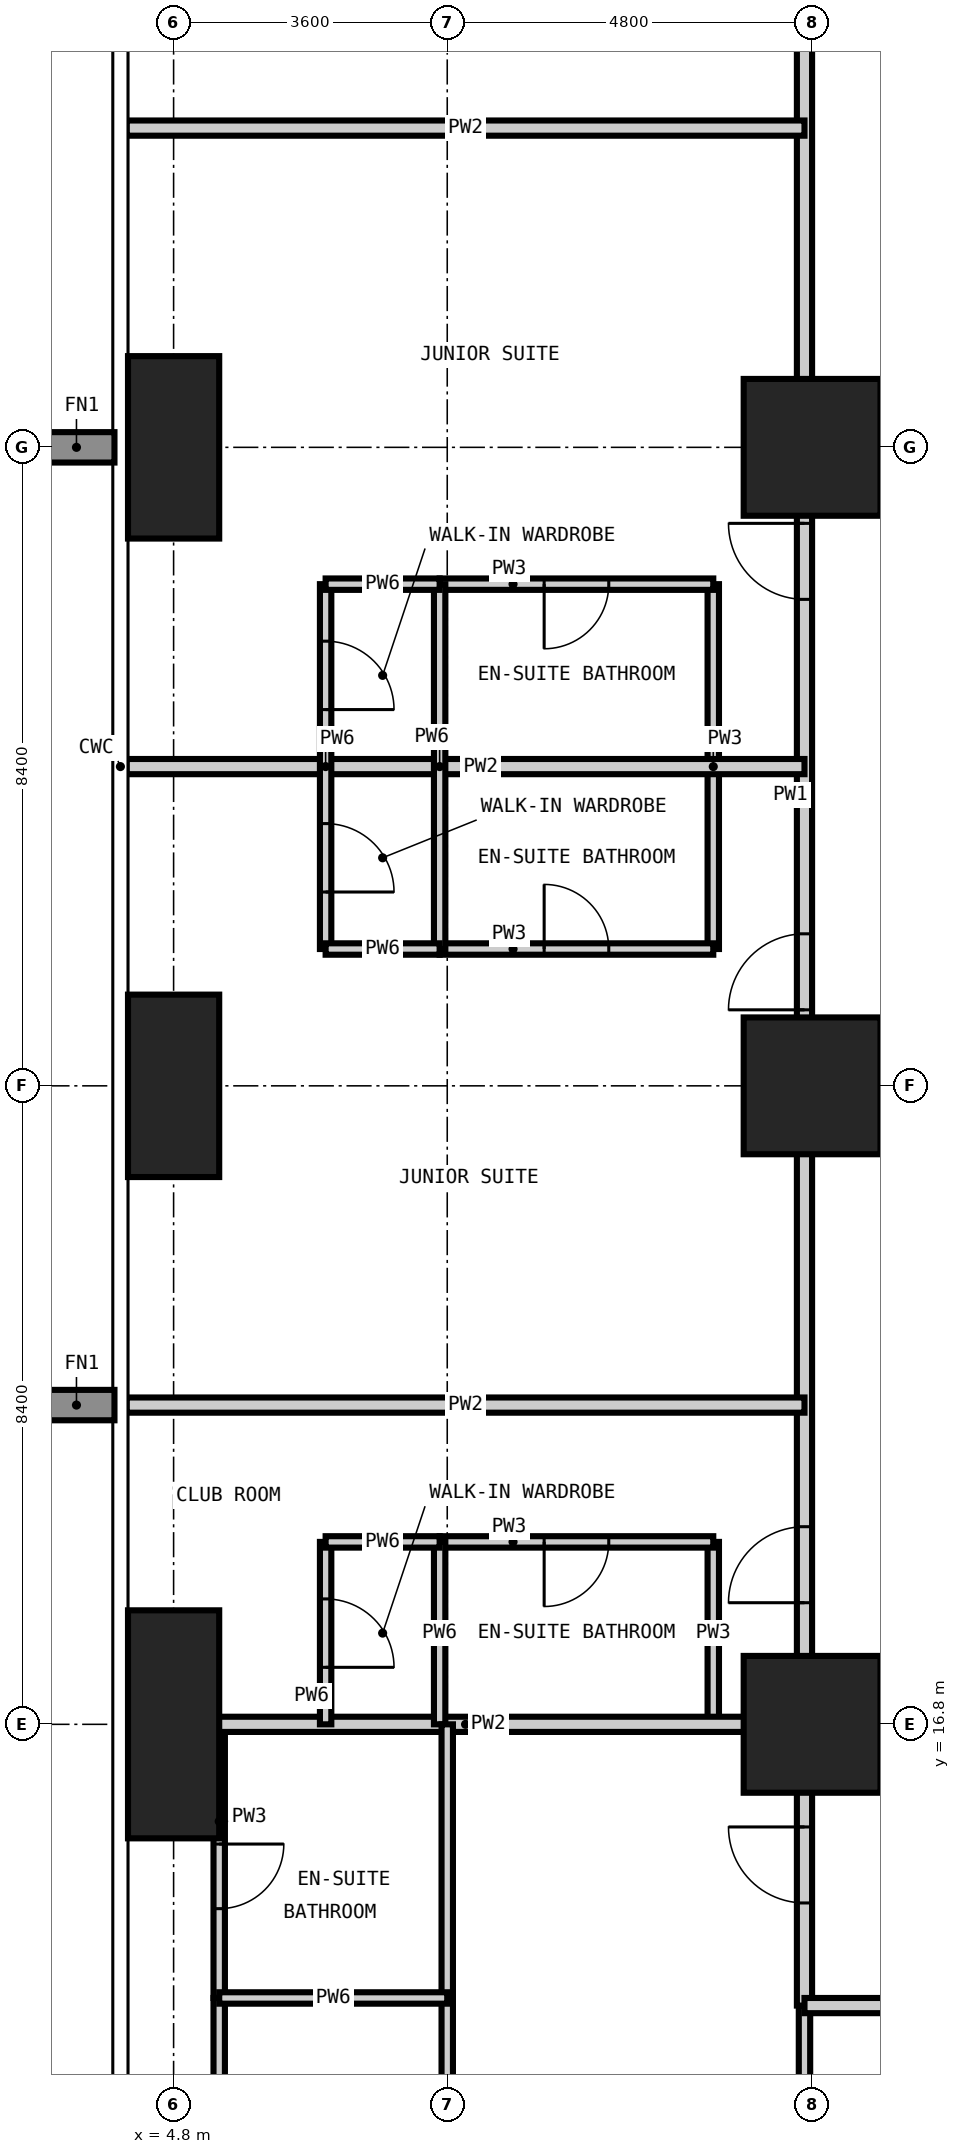
"""IFC4 building model, lengths in metres.
Left out: names, types, materials, properties, quantities, classifications, styles, units other than length and angle.
Written with IfcOpenShell. Run it as: python <this file> out.ifc"""

import sys

from ifc_helpers import new_model, si_unit, direction, frame, frame_2d, origin, origin_2d, place, context, subcontext, project, spatial, rectangle, extrude, element, fill, save


model = new_model("IFC4")
c1 = context("Model", 3, precision=1e-05, world=origin(), true_north=direction((0.0, 1.0)))
c2 = subcontext(c1, "Body", "Model", "MODEL_VIEW")
j1 = project(units=[si_unit("LENGTHUNIT", "METRE"), si_unit("PLANEANGLEUNIT", "RADIAN")], contexts=[c1])
p1 = place(None, origin())
s1 = spatial("IfcSite", under=j1, at=p1, CompositionType="ELEMENT")
p2 = place(p1, origin())
s2 = spatial("IfcBuilding", under=s1, at=p2, CompositionType="ELEMENT")
p3 = place(p2, frame((0.0, 0.0, 216.6)))
s3 = spatial("IfcBuildingStorey", under=s2, at=p3, CompositionType="ELEMENT", Elevation=216.6)
p4 = place(p3, frame((4.8, 16.8, -0.35), z_axis=(0.0, 0.0, 1.0), x_axis=(1.0, 0.0, 0.0)))
e1 = element("IfcColumn", 1, at=p4, inside=s3, PredefinedType="COLUMN", context=c2, shape_type="SweptSolid", body=[
    extrude(rectangle(XDim=1.2, YDim=3.0, at=origin_2d()), origin(), (0.0, 0.0, 1.0), 3.55),
])
for number, where, z_axis, x_axis in (
    (2, (4.8, 25.2, -0.35), (0.0, 0.0, 1.0), (1.0, 0.0, 0.0)),
    (3, (4.8, 33.6, -0.35), (0.0, 0.0, 1.0), (1.0, 0.0, 0.0)),
):
    element("IfcColumn", number, at=place(p3, frame(where, z_axis=z_axis, x_axis=x_axis)), inside=s3, PredefinedType="COLUMN", context=c2, shape_type="SweptSolid", body=[
        extrude(rectangle(XDim=1.2, YDim=2.4, at=origin_2d()), origin(), (0.0, 0.0, 1.0), 3.55),
    ])
for number, where, z_axis, x_axis in (
    (4, (13.2, 16.8, -0.35), (0.0, 0.0, 1.0), (1.0, 0.0, 0.0)),
    (5, (13.2, 25.2, -0.35), (0.0, 0.0, 1.0), (1.0, 0.0, 0.0)),
    (6, (13.2, 33.6, -0.35), (0.0, 0.0, 1.0), (1.0, 0.0, 0.0)),
):
    element("IfcColumn", number, at=place(p3, frame(where, z_axis=z_axis, x_axis=x_axis)), inside=s3, PredefinedType="COLUMN", context=c2, shape_type="SweptSolid", body=[
        extrude(rectangle(XDim=1.8, YDim=1.8, at=origin_2d()), origin(), (0.0, 0.0, 1.0), 3.55),
    ])
p5 = place(p3, frame((5.4, 13.2, 0.0), z_axis=(0.0, 0.0, 1.0), x_axis=(0.0, 1.0, 0.0)))
e7 = element("IfcWall", 7, at=p5, inside=s3, PredefinedType="PARTITIONING", context=c2, shape_type="SweptSolid", body=[
    extrude(rectangle(XDim=3.6, YDim=0.15, at=frame_2d((1.8, 0.0))), origin(), (0.0, 0.0, 1.0), 3.2),
])
p6 = place(p5, frame((1.175, 0.0, 0.0)))
e8 = element("IfcOpeningElement", 8, at=p6, cuts=e7, PredefinedType="OPENING", context=c2, shape_type="SweptSolid", body=[
    extrude(rectangle(XDim=0.85, YDim=2.1, at=frame_2d((0.425, 1.05))), frame((0.0, 0.085, 0.0), z_axis=(0.0, -1.0, 0.0), x_axis=(1.0, 0.0, 0.0)), (0.0, 0.0, 1.0), 0.17),
])
p7 = place(p3, frame((11.9, 16.8, 0.0), z_axis=(0.0, 0.0, 1.0), x_axis=(0.0, 1.0, 0.0)))
e9 = element("IfcWall", 9, at=p7, inside=s3, PredefinedType="PARTITIONING", context=c2, shape_type="SweptSolid", body=[
    extrude(rectangle(XDim=2.4, YDim=0.15, at=frame_2d((1.2, 0.0))), origin(), (0.0, 0.0, 1.0), 3.2),
])
p8 = place(p3, frame((11.9, 27.0, 0.0), z_axis=(0.0, 0.0, 1.0), x_axis=(0.0, 1.0, 0.0)))
e10 = element("IfcWall", 10, at=p8, inside=s3, PredefinedType="PARTITIONING", context=c2, shape_type="SweptSolid", body=[
    extrude(rectangle(XDim=4.8, YDim=0.15, at=frame_2d((2.4, 0.0))), origin(), (0.0, 0.0, 1.0), 3.2),
])
p9 = place(p3, frame((13.1, 10.1, 0.0), z_axis=(0.0, 0.0, 1.0), x_axis=(0.0, 1.0, 0.0)))
e11 = element("IfcWall", 11, at=p9, inside=s3, PredefinedType="PARTITIONING", context=c2, shape_type="SweptSolid", body=[
    extrude(rectangle(XDim=3.0, YDim=0.15, at=frame_2d((1.5, 0.0))), origin(), (0.0, 0.0, 1.0), 3.2),
])
p10 = place(p3, frame((8.3, 19.2, 0.0), z_axis=(0.0, 0.0, 1.0), x_axis=(1.0, 0.0, 0.0)))
e12 = element("IfcWall", 12, at=p10, inside=s3, PredefinedType="PARTITIONING", context=c2, shape_type="SweptSolid", body=[
    extrude(rectangle(XDim=3.6, YDim=0.15, at=frame_2d((1.8, 0.0))), origin(), (0.0, 0.0, 1.0), 3.2),
])
p11 = place(p10, frame((1.375, 0.0, 0.0)))
e13 = element("IfcOpeningElement", 13, at=p11, cuts=e12, PredefinedType="OPENING", context=c2, shape_type="SweptSolid", body=[
    extrude(rectangle(XDim=0.85, YDim=2.1, at=frame_2d((0.425, 1.05))), frame((0.0, 0.085, 0.0), z_axis=(0.0, -1.0, 0.0), x_axis=(1.0, 0.0, 0.0)), (0.0, 0.0, 1.0), 0.17),
])
p12 = place(p3, frame((8.3, 27.0, 0.0), z_axis=(0.0, 0.0, 1.0), x_axis=(1.0, 0.0, 0.0)))
e14 = element("IfcWall", 14, at=p12, inside=s3, PredefinedType="PARTITIONING", context=c2, shape_type="SweptSolid", body=[
    extrude(rectangle(XDim=3.6, YDim=0.15, at=frame_2d((1.8, 0.0))), origin(), (0.0, 0.0, 1.0), 3.2),
])
p13 = place(p12, frame((1.375, 0.0, 0.0)))
e15 = element("IfcOpeningElement", 15, at=p13, cuts=e14, PredefinedType="OPENING", context=c2, shape_type="SweptSolid", body=[
    extrude(rectangle(XDim=0.85, YDim=2.1, at=frame_2d((0.425, 1.05))), frame((0.0, 0.085, 0.0), z_axis=(0.0, -1.0, 0.0), x_axis=(1.0, 0.0, 0.0)), (0.0, 0.0, 1.0), 0.17),
])
p14 = place(p3, frame((8.3, 31.8, 0.0), z_axis=(0.0, 0.0, 1.0), x_axis=(1.0, 0.0, 0.0)))
e16 = element("IfcWall", 16, at=p14, inside=s3, PredefinedType="PARTITIONING", context=c2, shape_type="SweptSolid", body=[
    extrude(rectangle(XDim=3.6, YDim=0.15, at=frame_2d((1.8, 0.0))), origin(), (0.0, 0.0, 1.0), 3.2),
])
p15 = place(p14, frame((1.375, 0.0, 0.0)))
e17 = element("IfcOpeningElement", 17, at=p15, cuts=e16, PredefinedType="OPENING", context=c2, shape_type="SweptSolid", body=[
    extrude(rectangle(XDim=0.85, YDim=2.1, at=frame_2d((0.425, 1.05))), frame((0.0, 0.085, 0.0), z_axis=(0.0, -1.0, 0.0), x_axis=(1.0, 0.0, 0.0)), (0.0, 0.0, 1.0), 0.17),
])
p16 = place(p3, frame((13.1, 13.1, 0.0), z_axis=(0.0, 0.0, 1.0), x_axis=(0.0, 1.0, 0.0)))
e18 = element("IfcWall", 18, at=p16, inside=s3, PredefinedType="PARTITIONING", context=c2, shape_type="SweptSolid", body=[
    extrude(rectangle(XDim=32.0, YDim=0.2, at=frame_2d((16.0, 0.0))), origin(), (0.0, 0.0, 1.0), 3.2),
])
p17 = place(p16, frame((5.3, 0.0, 0.0)))
e19 = element("IfcOpeningElement", 19, at=p17, cuts=e18, PredefinedType="OPENING", context=c2, shape_type="SweptSolid", body=[
    extrude(rectangle(XDim=1.0, YDim=2.2, at=frame_2d((0.5, 1.1))), frame((0.0, 0.11, 0.0), z_axis=(0.0, -1.0, 0.0), x_axis=(1.0, 0.0, 0.0)), (0.0, 0.0, 1.0), 0.22),
])
p18 = place(p16, frame((13.1, 0.0, 0.0)))
e20 = element("IfcOpeningElement", 20, at=p18, cuts=e18, PredefinedType="OPENING", context=c2, shape_type="SweptSolid", body=[
    extrude(rectangle(XDim=1.0, YDim=2.2, at=frame_2d((0.5, 1.1))), frame((0.0, 0.11, 0.0), z_axis=(0.0, -1.0, 0.0), x_axis=(1.0, 0.0, 0.0)), (0.0, 0.0, 1.0), 0.22),
])
p19 = place(p16, frame((18.5, 0.0, 0.0)))
e21 = element("IfcOpeningElement", 21, at=p19, cuts=e18, PredefinedType="OPENING", context=c2, shape_type="SweptSolid", body=[
    extrude(rectangle(XDim=1.0, YDim=2.2, at=frame_2d((0.5, 1.1))), frame((0.0, 0.11, 0.0), z_axis=(0.0, -1.0, 0.0), x_axis=(1.0, 0.0, 0.0)), (0.0, 0.0, 1.0), 0.22),
])
p20 = place(p16, frame((26.3, 0.0, 0.0)))
e22 = element("IfcOpeningElement", 22, at=p20, cuts=e18, PredefinedType="OPENING", context=c2, shape_type="SweptSolid", body=[
    extrude(rectangle(XDim=1.0, YDim=2.2, at=frame_2d((0.5, 1.1))), frame((0.0, 0.11, 0.0), z_axis=(0.0, -1.0, 0.0), x_axis=(1.0, 0.0, 0.0)), (0.0, 0.0, 1.0), 0.22),
])
p21 = place(p16, frame((1.35, 0.0, 0.0)))
e23 = element("IfcOpeningElement", 23, at=p21, cuts=e18, PredefinedType="OPENING", context=c2, shape_type="SweptSolid", body=[
    extrude(rectangle(XDim=1.0, YDim=2.2, at=frame_2d((0.5, 1.1))), frame((0.0, 0.11, 0.0), z_axis=(0.0, -1.0, 0.0), x_axis=(1.0, 0.0, 0.0)), (0.0, 0.0, 1.0), 0.22),
])
p22 = place(p16, frame((29.95, 0.0, 0.0)))
e24 = element("IfcOpeningElement", 24, at=p22, cuts=e18, PredefinedType="OPENING", context=c2, shape_type="SweptSolid", body=[
    extrude(rectangle(XDim=1.0, YDim=2.2, at=frame_2d((0.5, 1.1))), frame((0.0, 0.11, 0.0), z_axis=(0.0, -1.0, 0.0), x_axis=(1.0, 0.0, 0.0)), (0.0, 0.0, 1.0), 0.22),
])
p23 = place(p3, frame((44.5, 13.1, 0.0), z_axis=(0.0, 0.0, 1.0), x_axis=(-1.0, 0.0, 0.0)))
e25 = element("IfcWall", 25, at=p23, inside=s3, PredefinedType="PARTITIONING", context=c2, shape_type="SweptSolid", body=[
    extrude(rectangle(XDim=31.4, YDim=0.2, at=frame_2d((15.7, 0.0))), origin(), (0.0, 0.0, 1.0), 3.2),
])
p24 = place(p23, frame((24.2, 0.0, 0.0)))
e26 = element("IfcOpeningElement", 26, at=p24, cuts=e25, PredefinedType="OPENING", context=c2, shape_type="SweptSolid", body=[
    extrude(rectangle(XDim=1.0, YDim=2.2, at=frame_2d((0.5, 1.1))), frame((0.0, 0.11, 0.0), z_axis=(0.0, -1.0, 0.0), x_axis=(1.0, 0.0, 0.0)), (0.0, 0.0, 1.0), 0.22),
])
p25 = place(p23, frame((13.4, 0.0, 0.0)))
e27 = element("IfcOpeningElement", 27, at=p25, cuts=e25, PredefinedType="OPENING", context=c2, shape_type="SweptSolid", body=[
    extrude(rectangle(XDim=1.0, YDim=2.2, at=frame_2d((0.5, 1.1))), frame((0.0, 0.11, 0.0), z_axis=(0.0, -1.0, 0.0), x_axis=(1.0, 0.0, 0.0)), (0.0, 0.0, 1.0), 0.22),
])
p26 = place(p23, frame((7.4, 0.0, 0.0)))
e28 = element("IfcOpeningElement", 28, at=p26, cuts=e25, PredefinedType="OPENING", context=c2, shape_type="SweptSolid", body=[
    extrude(rectangle(XDim=1.0, YDim=2.2, at=frame_2d((0.5, 1.1))), frame((0.0, 0.11, 0.0), z_axis=(0.0, -1.0, 0.0), x_axis=(1.0, 0.0, 0.0)), (0.0, 0.0, 1.0), 0.22),
])
for number, where, z_axis, x_axis in (
    (29, (4.182, 16.8, 0.0), (0.0, 0.0, 1.0), (1.0, 0.0, 0.0)),
    (30, (4.182, 21.0, 0.0), (0.0, 0.0, 1.0), (1.0, 0.0, 0.0)),
    (31, (4.182, 29.4, 0.0), (0.0, 0.0, 1.0), (1.0, 0.0, 0.0)),
    (32, (4.182, 37.8, 0.0), (0.0, 0.0, 1.0), (1.0, 0.0, 0.0)),
):
    element("IfcWall", number, at=place(p3, frame(where, z_axis=z_axis, x_axis=x_axis)), inside=s3, PredefinedType="PARTITIONING", context=c2, shape_type="SweptSolid", body=[
        extrude(rectangle(XDim=8.918, YDim=0.2, at=frame_2d((4.459, 0.0))), origin(), (0.0, 0.0, 1.0), 3.2),
    ])
p27 = place(p3, frame((5.4, 10.8, 0.0), z_axis=(0.0, 0.0, 1.0), x_axis=(0.0, 1.0, 0.0)))
e33 = element("IfcWall", 33, at=p27, inside=s3, PredefinedType="PARTITIONING", context=c2, shape_type="SweptSolid", body=[
    extrude(rectangle(XDim=2.4, YDim=0.15, at=frame_2d((1.2, 0.0))), origin(), (0.0, 0.0, 1.0), 3.2),
])
p28 = place(p3, frame((6.8, 16.8, 0.0), z_axis=(0.0, 0.0, 1.0), x_axis=(0.0, 1.0, 0.0)))
e34 = element("IfcWall", 34, at=p28, inside=s3, PredefinedType="PARTITIONING", context=c2, shape_type="SweptSolid", body=[
    extrude(rectangle(XDim=2.4, YDim=0.15, at=frame_2d((1.2, 0.0))), origin(), (0.0, 0.0, 1.0), 3.2),
])
p29 = place(p28, frame((0.75, 0.0, 0.0)))
e35 = element("IfcOpeningElement", 35, at=p29, cuts=e34, PredefinedType="OPENING", context=c2, shape_type="SweptSolid", body=[
    extrude(rectangle(XDim=0.9, YDim=2.1, at=frame_2d((0.45, 1.05))), frame((0.0, 0.085, 0.0), z_axis=(0.0, -1.0, 0.0), x_axis=(1.0, 0.0, 0.0)), (0.0, 0.0, 1.0), 0.17),
])
p30 = place(p3, frame((6.8, 27.0, 0.0), z_axis=(0.0, 0.0, 1.0), x_axis=(0.0, 1.0, 0.0)))
e36 = element("IfcWall", 36, at=p30, inside=s3, PredefinedType="PARTITIONING", context=c2, shape_type="SweptSolid", body=[
    extrude(rectangle(XDim=4.8, YDim=0.15, at=frame_2d((2.4, 0.0))), origin(), (0.0, 0.0, 1.0), 3.2),
])
p31 = place(p30, frame((0.75, 0.0, 0.0)))
e37 = element("IfcOpeningElement", 37, at=p31, cuts=e36, PredefinedType="OPENING", context=c2, shape_type="SweptSolid", body=[
    extrude(rectangle(XDim=0.9, YDim=2.1, at=frame_2d((0.45, 1.05))), frame((0.0, 0.085, 0.0), z_axis=(0.0, -1.0, 0.0), x_axis=(1.0, 0.0, 0.0)), (0.0, 0.0, 1.0), 0.17),
])
p32 = place(p30, frame((3.15, 0.0, 0.0)))
e38 = element("IfcOpeningElement", 38, at=p32, cuts=e36, PredefinedType="OPENING", context=c2, shape_type="SweptSolid", body=[
    extrude(rectangle(XDim=0.9, YDim=2.1, at=frame_2d((0.45, 1.05))), frame((0.0, 0.085, 0.0), z_axis=(0.0, -1.0, 0.0), x_axis=(1.0, 0.0, 0.0)), (0.0, 0.0, 1.0), 0.17),
])
p33 = place(p3, frame((8.3, 16.8, 0.0), z_axis=(0.0, 0.0, 1.0), x_axis=(0.0, 1.0, 0.0)))
e39 = element("IfcWall", 39, at=p33, inside=s3, PredefinedType="PARTITIONING", context=c2, shape_type="SweptSolid", body=[
    extrude(rectangle(XDim=2.4, YDim=0.15, at=frame_2d((1.2, 0.0))), origin(), (0.0, 0.0, 1.0), 3.2),
])
p34 = place(p3, frame((8.3, 27.0, 0.0), z_axis=(0.0, 0.0, 1.0), x_axis=(0.0, 1.0, 0.0)))
e40 = element("IfcWall", 40, at=p34, inside=s3, PredefinedType="PARTITIONING", context=c2, shape_type="SweptSolid", body=[
    extrude(rectangle(XDim=4.8, YDim=0.15, at=frame_2d((2.4, 0.0))), origin(), (0.0, 0.0, 1.0), 3.2),
])
p35 = place(p3, frame((8.4, 4.182, 0.0), z_axis=(0.0, 0.0, 1.0), x_axis=(0.0, 1.0, 0.0)))
e41 = element("IfcWall", 41, at=p35, inside=s3, PredefinedType="PARTITIONING", context=c2, shape_type="SweptSolid", body=[
    extrude(rectangle(XDim=12.618, YDim=0.15, at=frame_2d((6.309, 0.0))), origin(), (0.0, 0.0, 1.0), 3.2),
])
p36 = place(p35, frame((2.868, 0.0, 0.0)))
e42 = element("IfcOpeningElement", 42, at=p36, cuts=e41, PredefinedType="OPENING", context=c2, shape_type="SweptSolid", body=[
    extrude(rectangle(XDim=0.9, YDim=2.1, at=frame_2d((0.45, 1.05))), frame((0.0, 0.085, 0.0), z_axis=(0.0, -1.0, 0.0), x_axis=(1.0, 0.0, 0.0)), (0.0, 0.0, 1.0), 0.17),
])
p37 = place(p3, frame((5.4, 13.2, 0.0), z_axis=(0.0, 0.0, 1.0), x_axis=(1.0, 0.0, 0.0)))
e43 = element("IfcWall", 43, at=p37, inside=s3, PredefinedType="PARTITIONING", context=c2, shape_type="SweptSolid", body=[
    extrude(rectangle(XDim=3.0, YDim=0.15, at=frame_2d((1.5, 0.0))), origin(), (0.0, 0.0, 1.0), 3.2),
])
for number, where, z_axis, x_axis in (
    (44, (6.8, 19.2, 0.0), (0.0, 0.0, 1.0), (1.0, 0.0, 0.0)),
    (45, (6.8, 27.0, 0.0), (0.0, 0.0, 1.0), (1.0, 0.0, 0.0)),
    (46, (6.8, 31.8, 0.0), (0.0, 0.0, 1.0), (1.0, 0.0, 0.0)),
):
    element("IfcWall", number, at=place(p3, frame(where, z_axis=z_axis, x_axis=x_axis)), inside=s3, PredefinedType="PARTITIONING", context=c2, shape_type="SweptSolid", body=[
        extrude(rectangle(XDim=1.5, YDim=0.15, at=frame_2d((0.75, 0.0))), origin(), (0.0, 0.0, 1.0), 3.2),
    ])
p38 = place(p17, origin())
e47 = element("IfcDoor", 47, at=p38, inside=s3, OperationType="SINGLE_SWING_LEFT", PredefinedType="DOOR", context=c2, shape_type="SweptSolid", body=[
    extrude(rectangle(XDim=1.0, YDim=2.2, at=frame_2d((0.5, 1.1))), frame((0.0, 0.025, 0.0), z_axis=(0.0, -1.0, 0.0), x_axis=(1.0, 0.0, 0.0)), (0.0, 0.0, 1.0), 0.05),
])
fill(e19, e47)
p39 = place(p11, frame((0.85, 0.0, 0.0), z_axis=(0.0, 0.0, 1.0), x_axis=(-1.0, 0.0, 0.0)))
e48 = element("IfcDoor", 48, at=p39, inside=s3, OperationType="SINGLE_SWING_RIGHT", PredefinedType="DOOR", context=c2, shape_type="SweptSolid", body=[
    extrude(rectangle(XDim=0.85, YDim=2.1, at=frame_2d((0.425, 1.05))), frame((0.0, 0.025, 0.0), z_axis=(0.0, -1.0, 0.0), x_axis=(1.0, 0.0, 0.0)), (0.0, 0.0, 1.0), 0.05),
])
fill(e13, e48)
p40 = place(p29, frame((0.9, 0.0, 0.0), z_axis=(0.0, 0.0, 1.0), x_axis=(-1.0, 0.0, 0.0)))
e49 = element("IfcDoor", 49, at=p40, inside=s3, OperationType="SINGLE_SWING_RIGHT", PredefinedType="DOOR", context=c2, shape_type="SweptSolid", body=[
    extrude(rectangle(XDim=0.9, YDim=2.1, at=frame_2d((0.45, 1.05))), frame((0.0, 0.025, 0.0), z_axis=(0.0, -1.0, 0.0), x_axis=(1.0, 0.0, 0.0)), (0.0, 0.0, 1.0), 0.05),
])
fill(e35, e49)
p41 = place(p18, origin())
e50 = element("IfcDoor", 50, at=p41, inside=s3, OperationType="SINGLE_SWING_LEFT", PredefinedType="DOOR", context=c2, shape_type="SweptSolid", body=[
    extrude(rectangle(XDim=1.0, YDim=2.2, at=frame_2d((0.5, 1.1))), frame((0.0, 0.025, 0.0), z_axis=(0.0, -1.0, 0.0), x_axis=(1.0, 0.0, 0.0)), (0.0, 0.0, 1.0), 0.05),
])
fill(e20, e50)
p42 = place(p13, origin())
e51 = element("IfcDoor", 51, at=p42, inside=s3, OperationType="SINGLE_SWING_LEFT", PredefinedType="DOOR", context=c2, shape_type="SweptSolid", body=[
    extrude(rectangle(XDim=0.85, YDim=2.1, at=frame_2d((0.425, 1.05))), frame((0.0, 0.025, 0.0), z_axis=(0.0, -1.0, 0.0), x_axis=(1.0, 0.0, 0.0)), (0.0, 0.0, 1.0), 0.05),
])
fill(e15, e51)
p43 = place(p31, frame((0.9, 0.0, 0.0), z_axis=(0.0, 0.0, 1.0), x_axis=(-1.0, 0.0, 0.0)))
e52 = element("IfcDoor", 52, at=p43, inside=s3, OperationType="SINGLE_SWING_RIGHT", PredefinedType="DOOR", context=c2, shape_type="SweptSolid", body=[
    extrude(rectangle(XDim=0.9, YDim=2.1, at=frame_2d((0.45, 1.05))), frame((0.0, 0.025, 0.0), z_axis=(0.0, -1.0, 0.0), x_axis=(1.0, 0.0, 0.0)), (0.0, 0.0, 1.0), 0.05),
])
fill(e37, e52)
p44 = place(p19, origin())
e53 = element("IfcDoor", 53, at=p44, inside=s3, OperationType="SINGLE_SWING_RIGHT", PredefinedType="DOOR", context=c2, shape_type="SweptSolid", body=[
    extrude(rectangle(XDim=1.0, YDim=2.2, at=frame_2d((0.5, 1.1))), frame((0.0, 0.025, 0.0), z_axis=(0.0, -1.0, 0.0), x_axis=(1.0, 0.0, 0.0)), (0.0, 0.0, 1.0), 0.05),
])
fill(e21, e53)
p45 = place(p15, frame((0.85, 0.0, 0.0), z_axis=(0.0, 0.0, 1.0), x_axis=(-1.0, 0.0, 0.0)))
e54 = element("IfcDoor", 54, at=p45, inside=s3, OperationType="SINGLE_SWING_RIGHT", PredefinedType="DOOR", context=c2, shape_type="SweptSolid", body=[
    extrude(rectangle(XDim=0.85, YDim=2.1, at=frame_2d((0.425, 1.05))), frame((0.0, 0.025, 0.0), z_axis=(0.0, -1.0, 0.0), x_axis=(1.0, 0.0, 0.0)), (0.0, 0.0, 1.0), 0.05),
])
fill(e17, e54)
p46 = place(p32, frame((0.9, 0.0, 0.0), z_axis=(0.0, 0.0, 1.0), x_axis=(-1.0, 0.0, 0.0)))
e55 = element("IfcDoor", 55, at=p46, inside=s3, OperationType="SINGLE_SWING_RIGHT", PredefinedType="DOOR", context=c2, shape_type="SweptSolid", body=[
    extrude(rectangle(XDim=0.9, YDim=2.1, at=frame_2d((0.45, 1.05))), frame((0.0, 0.025, 0.0), z_axis=(0.0, -1.0, 0.0), x_axis=(1.0, 0.0, 0.0)), (0.0, 0.0, 1.0), 0.05),
])
fill(e38, e55)
p47 = place(p21, origin())
e56 = element("IfcDoor", 56, at=p47, inside=s3, OperationType="SINGLE_SWING_RIGHT", PredefinedType="DOOR", context=c2, shape_type="SweptSolid", body=[
    extrude(rectangle(XDim=1.0, YDim=2.2, at=frame_2d((0.5, 1.1))), frame((0.0, 0.025, 0.0), z_axis=(0.0, -1.0, 0.0), x_axis=(1.0, 0.0, 0.0)), (0.0, 0.0, 1.0), 0.05),
])
fill(e23, e56)
p48 = place(p6, frame((0.85, 0.0, 0.0), z_axis=(0.0, 0.0, 1.0), x_axis=(-1.0, 0.0, 0.0)))
e57 = element("IfcDoor", 57, at=p48, inside=s3, OperationType="SINGLE_SWING_LEFT", PredefinedType="DOOR", context=c2, shape_type="SweptSolid", body=[
    extrude(rectangle(XDim=0.85, YDim=2.1, at=frame_2d((0.425, 1.05))), frame((0.0, 0.025, 0.0), z_axis=(0.0, -1.0, 0.0), x_axis=(1.0, 0.0, 0.0)), (0.0, 0.0, 1.0), 0.05),
])
fill(e8, e57)
save(model, sys.argv[1])
